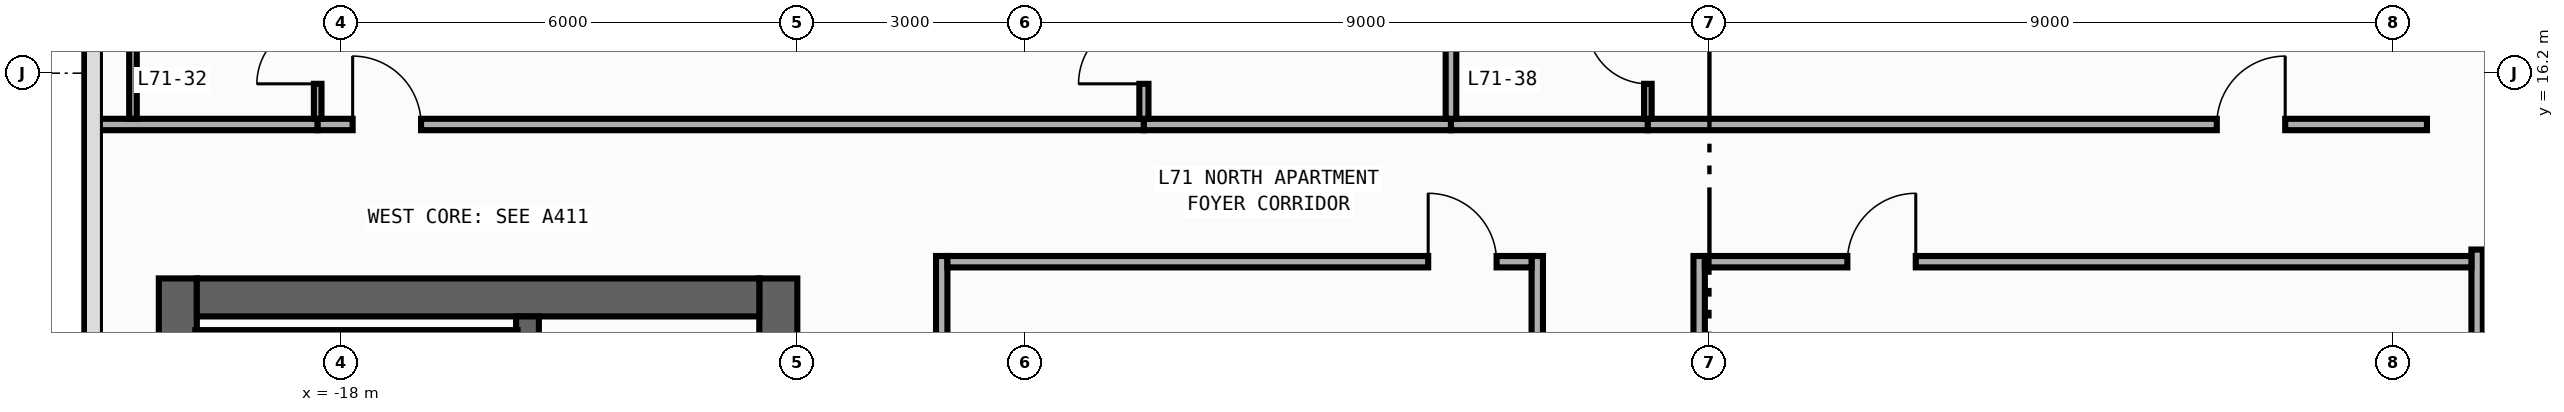
"""IFC4 building model, lengths in metres.
Left out: names, types, materials, properties, quantities, classifications, styles, units other than length and angle.
Written with IfcOpenShell. Run it as: python <this file> out.ifc"""

import sys

from ifc_helpers import new_model, si_unit, direction, frame, frame_2d, origin, place, context, subcontext, project, spatial, rectangle, extrude, element, fill, save


model = new_model("IFC4")
c1 = context("Model", 3, precision=1e-05, world=origin(), true_north=direction((0.0, 1.0)))
c2 = subcontext(c1, "Body", "Model", "MODEL_VIEW")
j1 = project(units=[si_unit("LENGTHUNIT", "METRE"), si_unit("PLANEANGLEUNIT", "RADIAN")], contexts=[c1])
p1 = place(None, origin())
s1 = spatial("IfcSite", under=j1, at=p1, CompositionType="ELEMENT")
p2 = place(p1, origin())
s2 = spatial("IfcBuilding", under=s1, at=p2, CompositionType="ELEMENT")
p3 = place(p2, frame((0.0, 0.0, 296.6)))
s3 = spatial("IfcBuildingStorey", under=s2, at=p3, CompositionType="ELEMENT", Elevation=296.6)
p4 = place(p3, frame((-20.15, -13.5, 0.0), z_axis=(0.0, 0.0, 1.0), x_axis=(0.0, 1.0, 0.0)))
e1 = element("IfcWall", 1, at=p4, inside=s3, PredefinedType="SHEAR", context=c2, shape_type="SweptSolid", body=[
    extrude(rectangle(XDim=27.0, YDim=0.5, at=frame_2d((13.5, 0.0))), origin(), (0.0, 0.0, 1.0), 3.54),
])
p5 = place(p3, frame((-12.25, -13.5, 0.0), z_axis=(0.0, 0.0, 1.0), x_axis=(0.0, 1.0, 0.0)))
e2 = element("IfcWall", 2, at=p5, inside=s3, PredefinedType="SHEAR", context=c2, shape_type="SweptSolid", body=[
    extrude(rectangle(XDim=27.0, YDim=0.5, at=frame_2d((13.5, 0.0))), origin(), (0.0, 0.0, 1.0), 3.54),
])
p6 = place(p5, frame((15.175, 0.0, 0.0)))
e3 = element("IfcOpeningElement", 3, at=p6, cuts=e2, PredefinedType="OPENING", context=c2, shape_type="SweptSolid", body=[
    extrude(rectangle(XDim=0.85, YDim=2.1, at=frame_2d((0.425, 1.05))), frame((0.0, 0.26, 0.0), z_axis=(0.0, -1.0, 0.0), x_axis=(1.0, 0.0, 0.0)), (0.0, 0.0, 1.0), 0.52),
])
p7 = place(p5, frame((21.275, 0.0, 0.0)))
e4 = element("IfcOpeningElement", 4, at=p7, cuts=e2, PredefinedType="OPENING", context=c2, shape_type="SweptSolid", body=[
    extrude(rectangle(XDim=0.85, YDim=2.1, at=frame_2d((0.425, 1.05))), frame((0.0, 0.26, 0.0), z_axis=(0.0, -1.0, 0.0), x_axis=(1.0, 0.0, 0.0)), (0.0, 0.0, 1.0), 0.52),
])
p8 = place(p5, frame((4.275, 0.0, 0.0)))
e5 = element("IfcOpeningElement", 5, at=p8, cuts=e2, PredefinedType="OPENING", context=c2, shape_type="SweptSolid", body=[
    extrude(rectangle(XDim=0.85, YDim=2.1, at=frame_2d((0.425, 1.05))), frame((0.0, 0.26, 0.0), z_axis=(0.0, -1.0, 0.0), x_axis=(1.0, 0.0, 0.0)), (0.0, 0.0, 1.0), 0.52),
])
p9 = place(p5, frame((10.275, 0.0, 0.0)))
e6 = element("IfcOpeningElement", 6, at=p9, cuts=e2, PredefinedType="OPENING", context=c2, shape_type="SweptSolid", body=[
    extrude(rectangle(XDim=0.85, YDim=2.1, at=frame_2d((0.425, 1.05))), frame((0.0, 0.26, 0.0), z_axis=(0.0, -1.0, 0.0), x_axis=(1.0, 0.0, 0.0)), (0.0, 0.0, 1.0), 0.52),
])
p10 = place(p5, frame((12.725, 0.0, 0.0)))
e7 = element("IfcOpeningElement", 7, at=p10, cuts=e2, PredefinedType="OPENING", context=c2, shape_type="SweptSolid", body=[
    extrude(rectangle(XDim=1.15, YDim=2.2, at=frame_2d((0.575, 1.1))), frame((0.0, 0.26, 0.0), z_axis=(0.0, -1.0, 0.0), x_axis=(1.0, 0.0, 0.0)), (0.0, 0.0, 1.0), 0.52),
])
p11 = place(p5, frame((1.625, 0.0, 0.0)))
e8 = element("IfcOpeningElement", 8, at=p11, cuts=e2, PredefinedType="OPENING", context=c2, shape_type="SweptSolid", body=[
    extrude(rectangle(XDim=0.85, YDim=2.1, at=frame_2d((0.425, 1.05))), frame((0.0, 0.26, 0.0), z_axis=(0.0, -1.0, 0.0), x_axis=(1.0, 0.0, 0.0)), (0.0, 0.0, 1.0), 0.52),
])
p12 = place(p3, frame((-19.9, 13.25, 0.0), z_axis=(0.0, 0.0, 1.0), x_axis=(1.0, 0.0, 0.0)))
e9 = element("IfcWall", 9, at=p12, inside=s3, PredefinedType="SHEAR", context=c2, shape_type="SweptSolid", body=[
    extrude(rectangle(XDim=7.4, YDim=0.5, at=frame_2d((3.7, 0.0))), origin(), (0.0, 0.0, 1.0), 3.54),
])
p13 = place(p3, frame((-15.55, -13.0, 0.0), z_axis=(0.0, 0.0, 1.0), x_axis=(0.0, 1.0, 0.0)))
e10 = element("IfcWall", 10, at=p13, inside=s3, PredefinedType="SHEAR", context=c2, shape_type="SweptSolid", body=[
    extrude(rectangle(XDim=26.0, YDim=0.3, at=frame_2d((13.0, 0.0))), origin(), (0.0, 0.0, 1.0), 3.54),
])
p14 = place(p13, frame((12.225, 0.0, 0.0)))
e11 = element("IfcOpeningElement", 11, at=p14, cuts=e10, PredefinedType="OPENING", context=c2, shape_type="SweptSolid", body=[
    extrude(rectangle(XDim=1.15, YDim=2.2, at=frame_2d((0.575, 1.1))), frame((0.0, 0.16, 0.0), z_axis=(0.0, -1.0, 0.0), x_axis=(1.0, 0.0, 0.0)), (0.0, 0.0, 1.0), 0.32),
])
p15 = place(p13, frame((1.125, 0.0, 0.0)))
e12 = element("IfcOpeningElement", 12, at=p15, cuts=e10, PredefinedType="OPENING", context=c2, shape_type="SweptSolid", body=[
    extrude(rectangle(XDim=0.85, YDim=2.1, at=frame_2d((0.425, 1.05))), frame((0.0, 0.16, 0.0), z_axis=(0.0, -1.0, 0.0), x_axis=(1.0, 0.0, 0.0)), (0.0, 0.0, 1.0), 0.32),
])
p16 = place(p3, frame((-19.92, 12.71, 0.0), z_axis=(0.0, 0.0, 1.0), x_axis=(1.0, 0.0, 0.0)))
e13 = element("IfcWall", 13, at=p16, inside=s3, PredefinedType="SHEAR", context=c2, shape_type="SweptSolid", body=[
    extrude(rectangle(XDim=4.24, YDim=0.22, at=frame_2d((2.12, 0.0))), origin(), (0.0, 0.0, 1.0), 3.54),
])
p17 = place(p3, frame((-10.1, -0.61, 0.0), z_axis=(0.0, 0.0, 1.0), x_axis=(0.0, 1.0, 0.0)))
e14 = element("IfcWall", 14, at=p17, inside=s3, PredefinedType="PARTITIONING", context=c2, shape_type="SweptSolid", body=[
    extrude(rectangle(XDim=14.405, YDim=0.15, at=frame_2d((7.203, 0.0))), origin(), (0.0, 0.0, 1.0), 3.54),
])
p18 = place(p17, frame((5.535, 0.0, 0.0)))
e15 = element("IfcOpeningElement", 15, at=p18, cuts=e14, PredefinedType="OPENING", context=c2, shape_type="SweptSolid", body=[
    extrude(rectangle(XDim=0.9, YDim=2.15, at=frame_2d((0.45, 1.075))), frame((0.0, 0.085, 0.0), z_axis=(0.0, -1.0, 0.0), x_axis=(1.0, 0.0, 0.0)), (0.0, 0.0, 1.0), 0.17),
])
p19 = place(p3, frame((10.1, -0.61, 0.0), z_axis=(0.0, 0.0, 1.0), x_axis=(0.0, 1.0, 0.0)))
e16 = element("IfcWall", 16, at=p19, inside=s3, PredefinedType="PARTITIONING", context=c2, shape_type="SweptSolid", body=[
    extrude(rectangle(XDim=14.49, YDim=0.15, at=frame_2d((7.245, 0.0))), origin(), (0.0, 0.0, 1.0), 3.54),
])
p20 = place(p19, frame((5.488, 0.0, 0.0)))
e17 = element("IfcOpeningElement", 17, at=p20, cuts=e16, PredefinedType="OPENING", context=c2, shape_type="SweptSolid", body=[
    extrude(rectangle(XDim=0.9, YDim=2.15, at=frame_2d((0.45, 1.075))), frame((0.0, 0.085, 0.0), z_axis=(0.0, -1.0, 0.0), x_axis=(1.0, 0.0, 0.0)), (0.0, 0.0, 1.0), 0.17),
])
p21 = place(p3, frame((-2.265, -0.46, 0.0), z_axis=(0.0, 0.0, 1.0), x_axis=(0.0, 1.0, 0.0)))
e18 = element("IfcWall", 18, at=p21, inside=s3, PredefinedType="PARTITIONING", context=c2, shape_type="SweptSolid", body=[
    extrude(rectangle(XDim=14.255, YDim=0.15, at=frame_2d((7.127, 0.0))), origin(), (0.0, 0.0, 1.0), 3.54),
])
p22 = place(p21, frame((5.474, 0.0, 0.0)))
e19 = element("IfcOpeningElement", 19, at=p22, cuts=e18, PredefinedType="OPENING", context=c2, shape_type="SweptSolid", body=[
    extrude(rectangle(XDim=0.9, YDim=2.15, at=frame_2d((0.45, 1.075))), frame((0.0, 0.085, 0.0), z_axis=(0.0, -1.0, 0.0), x_axis=(1.0, 0.0, 0.0)), (0.0, 0.0, 1.0), 0.17),
])
p23 = place(p3, frame((-0.135, -0.46, 0.0), z_axis=(0.0, 0.0, 1.0), x_axis=(0.0, 1.0, 0.0)))
e20 = element("IfcWall", 20, at=p23, inside=s3, PredefinedType="PARTITIONING", context=c2, shape_type="SweptSolid", body=[
    extrude(rectangle(XDim=14.255, YDim=0.15, at=frame_2d((7.127, 0.0))), origin(), (0.0, 0.0, 1.0), 3.54),
])
p24 = place(p23, frame((5.474, 0.0, 0.0)))
e21 = element("IfcOpeningElement", 21, at=p24, cuts=e20, PredefinedType="OPENING", context=c2, shape_type="SweptSolid", body=[
    extrude(rectangle(XDim=0.9, YDim=2.15, at=frame_2d((0.45, 1.075))), frame((0.0, 0.085, 0.0), z_axis=(0.0, -1.0, 0.0), x_axis=(1.0, 0.0, 0.0)), (0.0, 0.0, 1.0), 0.17),
])
p25 = place(p3, frame((-21.255, 15.525, 0.0), z_axis=(0.0, 0.0, 1.0), x_axis=(1.0, 0.0, 0.0)))
e22 = element("IfcWall", 22, at=p25, inside=s3, PredefinedType="PARTITIONING", context=c2, shape_type="SweptSolid", body=[
    extrude(rectangle(XDim=2.945, YDim=0.15, at=frame_2d((1.472, 0.0))), origin(), (0.0, 0.0, 1.0), 3.54),
])
p26 = place(p3, frame((-18.31, 15.525, 0.0), z_axis=(0.0, 0.0, 1.0), x_axis=(1.0, 0.0, 0.0)))
e23 = element("IfcWall", 23, at=p26, inside=s3, PredefinedType="PARTITIONING", context=c2, shape_type="SweptSolid", body=[
    extrude(rectangle(XDim=10.87, YDim=0.15, at=frame_2d((5.435, 0.0))), origin(), (0.0, 0.0, 1.0), 3.54),
])
p27 = place(p26, frame((0.46, 0.0, 0.0)))
e24 = element("IfcOpeningElement", 24, at=p27, cuts=e23, PredefinedType="OPENING", context=c2, shape_type="SweptSolid", body=[
    extrude(rectangle(XDim=0.9, YDim=2.15, at=frame_2d((0.45, 1.075))), frame((0.0, 0.085, 0.0), z_axis=(0.0, -1.0, 0.0), x_axis=(1.0, 0.0, 0.0)), (0.0, 0.0, 1.0), 0.17),
])
p28 = place(p3, frame((-7.44, 15.525, 0.0), z_axis=(0.0, 0.0, 1.0), x_axis=(1.0, 0.0, 0.0)))
e25 = element("IfcWall", 25, at=p28, inside=s3, PredefinedType="PARTITIONING", context=c2, shape_type="SweptSolid", body=[
    extrude(rectangle(XDim=4.04, YDim=0.15, at=frame_2d((2.02, 0.0))), origin(), (0.0, 0.0, 1.0), 3.54),
])
p29 = place(p3, frame((-3.4, 15.525, 0.0), z_axis=(0.0, 0.0, 1.0), x_axis=(1.0, 0.0, 0.0)))
e26 = element("IfcWall", 26, at=p29, inside=s3, PredefinedType="PARTITIONING", context=c2, shape_type="SweptSolid", body=[
    extrude(rectangle(XDim=2.59, YDim=0.15, at=frame_2d((1.295, 0.0))), origin(), (0.0, 0.0, 1.0), 3.54),
])
p30 = place(p3, frame((-0.81, 15.525, 0.0), z_axis=(0.0, 0.0, 1.0), x_axis=(1.0, 0.0, 0.0)))
e27 = element("IfcWall", 27, at=p30, inside=s3, PredefinedType="PARTITIONING", context=c2, shape_type="SweptSolid", body=[
    extrude(rectangle(XDim=10.25, YDim=0.15, at=frame_2d((5.125, 0.0))), origin(), (0.0, 0.0, 1.0), 3.54),
])
p31 = place(p30, frame((7.485, 0.0, 0.0)))
e28 = element("IfcOpeningElement", 28, at=p31, cuts=e27, PredefinedType="OPENING", context=c2, shape_type="SweptSolid", body=[
    extrude(rectangle(XDim=0.9, YDim=2.15, at=frame_2d((0.45, 1.075))), frame((0.0, 0.085, 0.0), z_axis=(0.0, -1.0, 0.0), x_axis=(1.0, 0.0, 0.0)), (0.0, 0.0, 1.0), 0.17),
])
p32 = place(p3, frame((-10.025, 13.72, 0.0), z_axis=(0.0, 0.0, 1.0), x_axis=(1.0, 0.0, 0.0)))
e29 = element("IfcWall", 29, at=p32, inside=s3, PredefinedType="PARTITIONING", context=c2, shape_type="SweptSolid", body=[
    extrude(rectangle(XDim=7.685, YDim=0.15, at=frame_2d((3.842, 0.0))), origin(), (0.0, 0.0, 1.0), 3.54),
])
p33 = place(p32, frame((6.325, 0.0, 0.0)))
e30 = element("IfcOpeningElement", 30, at=p33, cuts=e29, PredefinedType="OPENING", context=c2, shape_type="SweptSolid", body=[
    extrude(rectangle(XDim=0.9, YDim=2.15, at=frame_2d((0.45, 1.075))), frame((0.0, 0.085, 0.0), z_axis=(0.0, -1.0, 0.0), x_axis=(1.0, 0.0, 0.0)), (0.0, 0.0, 1.0), 0.17),
])
p34 = place(p3, frame((-0.06, 13.72, 0.0), z_axis=(0.0, 0.0, 1.0), x_axis=(1.0, 0.0, 0.0)))
e31 = element("IfcWall", 31, at=p34, inside=s3, PredefinedType="PARTITIONING", context=c2, shape_type="SweptSolid", body=[
    extrude(rectangle(XDim=10.085, YDim=0.15, at=frame_2d((5.042, 0.0))), origin(), (0.0, 0.0, 1.0), 3.54),
])
p35 = place(p34, frame((1.875, 0.0, 0.0)))
e32 = element("IfcOpeningElement", 32, at=p35, cuts=e31, PredefinedType="OPENING", context=c2, shape_type="SweptSolid", body=[
    extrude(rectangle(XDim=0.9, YDim=2.15, at=frame_2d((0.45, 1.075))), frame((0.0, 0.085, 0.0), z_axis=(0.0, -1.0, 0.0), x_axis=(1.0, 0.0, 0.0)), (0.0, 0.0, 1.0), 0.17),
])
p36 = place(p3, frame((-18.31, 15.6, 0.0), z_axis=(0.0, 0.0, 1.0), x_axis=(0.0, 1.0, 0.0)))
e33 = element("IfcWall", 33, at=p36, inside=s3, PredefinedType="PARTITIONING", context=c2, shape_type="SweptSolid", body=[
    extrude(rectangle(XDim=2.5, YDim=0.1, at=frame_2d((1.25, 0.0))), origin(), (0.0, 0.0, 1.0), 3.54),
])
p37 = place(p36, frame((0.46, 0.0, 0.0)))
e34 = element("IfcOpeningElement", 34, at=p37, cuts=e33, PredefinedType="OPENING", context=c2, shape_type="SweptSolid", body=[
    extrude(rectangle(XDim=0.8, YDim=2.1, at=frame_2d((0.4, 1.05))), frame((0.0, 0.06, 0.0), z_axis=(0.0, -1.0, 0.0), x_axis=(1.0, 0.0, 0.0)), (0.0, 0.0, 1.0), 0.12),
])
p38 = place(p3, frame((-7.44, 15.6, 0.0), z_axis=(0.0, 0.0, 1.0), x_axis=(0.0, 1.0, 0.0)))
e35 = element("IfcWall", 35, at=p38, inside=s3, PredefinedType="PARTITIONING", context=c2, shape_type="SweptSolid", body=[
    extrude(rectangle(XDim=4.5, YDim=0.12, at=frame_2d((2.25, 0.0))), origin(), (0.0, 0.0, 1.0), 3.54),
])
p39 = place(p38, frame((0.46, 0.0, 0.0)))
e36 = element("IfcOpeningElement", 36, at=p39, cuts=e35, PredefinedType="OPENING", context=c2, shape_type="SweptSolid", body=[
    extrude(rectangle(XDim=0.86, YDim=2.15, at=frame_2d((0.43, 1.075))), frame((0.0, 0.07, 0.0), z_axis=(0.0, -1.0, 0.0), x_axis=(1.0, 0.0, 0.0)), (0.0, 0.0, 1.0), 0.14),
])
p40 = place(p3, frame((-3.4, 15.6, 0.0), z_axis=(0.0, 0.0, 1.0), x_axis=(0.0, 1.0, 0.0)))
e37 = element("IfcWall", 37, at=p40, inside=s3, PredefinedType="PARTITIONING", context=c2, shape_type="SweptSolid", body=[
    extrude(rectangle(XDim=2.5, YDim=0.14, at=frame_2d((1.25, 0.0))), origin(), (0.0, 0.0, 1.0), 3.54),
])
p41 = place(p3, frame((-0.81, 15.6, 0.0), z_axis=(0.0, 0.0, 1.0), x_axis=(0.0, 1.0, 0.0)))
e38 = element("IfcWall", 38, at=p41, inside=s3, PredefinedType="PARTITIONING", context=c2, shape_type="SweptSolid", body=[
    extrude(rectangle(XDim=2.5, YDim=0.1, at=frame_2d((1.25, 0.0))), origin(), (0.0, 0.0, 1.0), 3.54),
])
p42 = place(p41, frame((0.46, 0.0, 0.0)))
e39 = element("IfcOpeningElement", 39, at=p42, cuts=e38, PredefinedType="OPENING", context=c2, shape_type="SweptSolid", body=[
    extrude(rectangle(XDim=0.8, YDim=2.1, at=frame_2d((0.4, 1.05))), frame((0.0, 0.06, 0.0), z_axis=(0.0, -1.0, 0.0), x_axis=(1.0, 0.0, 0.0)), (0.0, 0.0, 1.0), 0.12),
])
p43 = place(p3, frame((-20.74, 15.6, 0.0), z_axis=(0.0, 0.0, 1.0), x_axis=(0.0, 1.0, 0.0)))
e40 = element("IfcWall", 40, at=p43, inside=s3, PredefinedType="PARTITIONING", context=c2, shape_type="SweptSolid", body=[
    extrude(rectangle(XDim=2.45, YDim=0.1, at=frame_2d((1.225, 0.0))), origin(), (0.0, 0.0, 1.0), 3.54),
])
p44 = place(p27, origin())
e41 = element("IfcDoor", 41, at=p44, inside=s3, OperationType="SINGLE_SWING_LEFT", PredefinedType="DOOR", context=c2, shape_type="SweptSolid", body=[
    extrude(rectangle(XDim=0.9, YDim=2.15, at=frame_2d((0.45, 1.075))), frame((0.0, 0.025, 0.0), z_axis=(0.0, -1.0, 0.0), x_axis=(1.0, 0.0, 0.0)), (0.0, 0.0, 1.0), 0.05),
])
fill(e24, e41)
p45 = place(p31, origin())
e42 = element("IfcDoor", 42, at=p45, inside=s3, OperationType="SINGLE_SWING_RIGHT", PredefinedType="DOOR", context=c2, shape_type="SweptSolid", body=[
    extrude(rectangle(XDim=0.9, YDim=2.15, at=frame_2d((0.45, 1.075))), frame((0.0, 0.025, 0.0), z_axis=(0.0, -1.0, 0.0), x_axis=(1.0, 0.0, 0.0)), (0.0, 0.0, 1.0), 0.05),
])
fill(e28, e42)
p46 = place(p33, origin())
e43 = element("IfcDoor", 43, at=p46, inside=s3, OperationType="SINGLE_SWING_LEFT", PredefinedType="DOOR", context=c2, shape_type="SweptSolid", body=[
    extrude(rectangle(XDim=0.9, YDim=2.15, at=frame_2d((0.45, 1.075))), frame((0.0, 0.025, 0.0), z_axis=(0.0, -1.0, 0.0), x_axis=(1.0, 0.0, 0.0)), (0.0, 0.0, 1.0), 0.05),
])
fill(e30, e43)
p47 = place(p35, origin())
e44 = element("IfcDoor", 44, at=p47, inside=s3, OperationType="SINGLE_SWING_RIGHT", PredefinedType="DOOR", context=c2, shape_type="SweptSolid", body=[
    extrude(rectangle(XDim=0.9, YDim=2.15, at=frame_2d((0.45, 1.075))), frame((0.0, 0.025, 0.0), z_axis=(0.0, -1.0, 0.0), x_axis=(1.0, 0.0, 0.0)), (0.0, 0.0, 1.0), 0.05),
])
fill(e32, e44)
p48 = place(p37, origin())
e45 = element("IfcDoor", 45, at=p48, inside=s3, OperationType="SINGLE_SWING_LEFT", PredefinedType="DOOR", context=c2, shape_type="SweptSolid", body=[
    extrude(rectangle(XDim=0.8, YDim=2.1, at=frame_2d((0.4, 1.05))), frame((0.0, 0.025, 0.0), z_axis=(0.0, -1.0, 0.0), x_axis=(1.0, 0.0, 0.0)), (0.0, 0.0, 1.0), 0.05),
])
fill(e34, e45)
p49 = place(p39, origin())
e46 = element("IfcDoor", 46, at=p49, inside=s3, OperationType="SINGLE_SWING_LEFT", PredefinedType="DOOR", context=c2, shape_type="SweptSolid", body=[
    extrude(rectangle(XDim=0.86, YDim=2.15, at=frame_2d((0.43, 1.075))), frame((0.0, 0.025, 0.0), z_axis=(0.0, -1.0, 0.0), x_axis=(1.0, 0.0, 0.0)), (0.0, 0.0, 1.0), 0.05),
])
fill(e36, e46)
p50 = place(p42, origin())
e47 = element("IfcDoor", 47, at=p50, inside=s3, OperationType="SINGLE_SWING_RIGHT", PredefinedType="DOOR", context=c2, shape_type="SweptSolid", body=[
    extrude(rectangle(XDim=0.8, YDim=2.1, at=frame_2d((0.4, 1.05))), frame((0.0, 0.025, 0.0), z_axis=(0.0, -1.0, 0.0), x_axis=(1.0, 0.0, 0.0)), (0.0, 0.0, 1.0), 0.05),
])
fill(e39, e47)
save(model, sys.argv[1])
